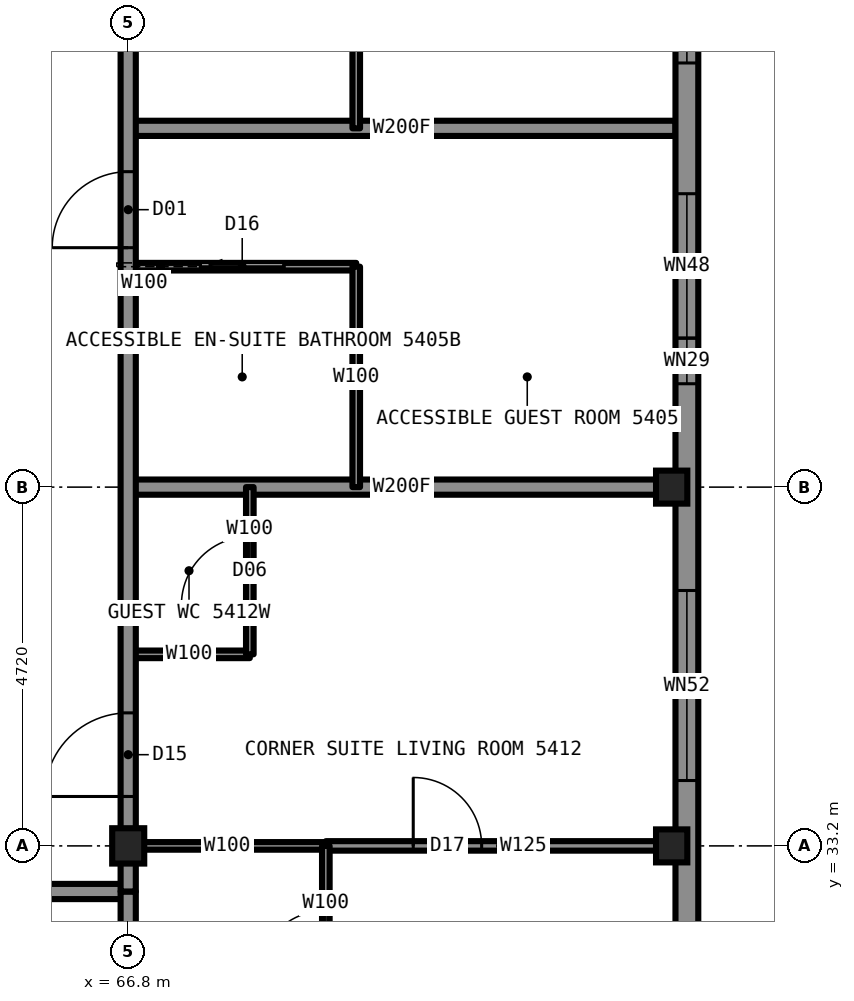
"""IFC4 building model, lengths in metres.
Left out: names, types, materials, properties, quantities, classifications, styles, units other than length and angle.
Written with IfcOpenShell. Run it as: python <this file> out.ifc"""

import sys

from ifc_helpers import new_model, si_unit, direction, frame, frame_2d, origin, origin_2d, place, context, subcontext, project, spatial, rectangle, i_section, extrude, element, fill, save


model = new_model("IFC4")
c1 = context("Model", 3, precision=1e-05, world=origin(), true_north=direction((0.0, 1.0)))
c2 = subcontext(c1, "Body", "Model", "MODEL_VIEW")
j1 = project(units=[si_unit("LENGTHUNIT", "METRE"), si_unit("PLANEANGLEUNIT", "RADIAN")], contexts=[c1])
p1 = place(None, origin())
s1 = spatial("IfcSite", under=j1, at=p1, CompositionType="ELEMENT")
p2 = place(p1, origin())
s2 = spatial("IfcBuilding", under=s1, at=p2, CompositionType="ELEMENT")
p3 = place(p2, frame((0.0, 0.0, 193.3)))
s3 = spatial("IfcBuildingStorey", under=s2, at=p3, CompositionType="ELEMENT", Elevation=193.3)
for number, where, z_axis, x_axis in (
    (1, (73.95, 33.2, 0.0), (0.0, 0.0, 1.0), (1.0, 0.0, 0.0)),
    (2, (73.95, 37.92, 0.0), (0.0, 0.0, 1.0), (1.0, 0.0, 0.0)),
):
    element("IfcColumn", number, at=place(p3, frame(where, z_axis=z_axis, x_axis=x_axis)), inside=s3, PredefinedType="COLUMN", context=c2, shape_type="SweptSolid", body=[
        extrude(i_section(OverallWidth=0.411, OverallDepth=0.434, WebThickness=0.036, FlangeThickness=0.057, at=origin_2d()), origin(), (0.0, 0.0, 1.0), 3.5),
    ])
p4 = place(p3, frame((66.8, 33.2, 0.0), z_axis=(0.0, 0.0, 1.0), x_axis=(1.0, 0.0, 0.0)))
e3 = element("IfcColumn", 3, at=p4, inside=s3, PredefinedType="COLUMN", context=c2, shape_type="SweptSolid", body=[
    extrude(i_section(OverallWidth=0.422, OverallDepth=0.465, WebThickness=0.045, FlangeThickness=0.073, at=origin_2d()), origin(), (0.0, 0.0, 1.0), 3.5),
])
p5 = place(p3, frame((66.8, 33.2, 0.0), z_axis=(0.0, 0.0, 1.0), x_axis=(1.0, 0.0, 0.0)))
e4 = element("IfcWall", 4, at=p5, inside=s3, PredefinedType="PARTITIONING", context=c2, shape_type="SweptSolid", body=[
    extrude(rectangle(XDim=2.6, YDim=0.1, at=frame_2d((1.3, 0.0))), origin(), (0.0, 0.0, 1.0), 2.573),
])
p6 = place(p3, frame((69.4, 33.2, 0.0), z_axis=(0.0, 0.0, 1.0), x_axis=(1.0, 0.0, 0.0)))
e5 = element("IfcWall", 5, at=p6, inside=s3, PredefinedType="PARTITIONING", context=c2, shape_type="SweptSolid", body=[
    extrude(rectangle(XDim=4.6, YDim=0.125, at=frame_2d((2.3, 0.0))), origin(), (0.0, 0.0, 1.0), 2.573),
])
p7 = place(p6, frame((1.15, 0.0, 0.0)))
e6 = element("IfcOpeningElement", 6, at=p7, cuts=e5, PredefinedType="OPENING", context=c2, shape_type="SweptSolid", body=[
    extrude(rectangle(XDim=0.9, YDim=2.2, at=frame_2d((0.45, 1.1))), frame((0.0, 0.073, 0.0), z_axis=(0.0, -1.0, 0.0), x_axis=(1.0, 0.0, 0.0)), (0.0, 0.0, 1.0), 0.145),
])
p8 = place(p3, frame((43.2, 32.6, 0.0), z_axis=(0.0, 0.0, 1.0), x_axis=(1.0, 0.0, 0.0)))
e7 = element("IfcWall", 7, at=p8, inside=s3, PredefinedType="PARTITIONING", context=c2, shape_type="SweptSolid", body=[
    extrude(rectangle(XDim=23.6, YDim=0.2, at=frame_2d((11.8, 0.0))), origin(), (0.0, 0.0, 1.0), 3.33),
])
p9 = place(p8, frame((3.0, 0.0, 0.0)))
e8 = element("IfcOpeningElement", 8, at=p9, cuts=e7, PredefinedType="OPENING", context=c2, shape_type="SweptSolid", body=[
    extrude(rectangle(XDim=1.0, YDim=2.2, at=frame_2d((0.5, 1.1))), frame((0.0, 0.11, 0.0), z_axis=(0.0, -1.0, 0.0), x_axis=(1.0, 0.0, 0.0)), (0.0, 0.0, 1.0), 0.22),
])
p10 = place(p8, frame((11.29, 0.0, 0.0)))
e9 = element("IfcOpeningElement", 9, at=p10, cuts=e7, PredefinedType="OPENING", context=c2, shape_type="SweptSolid", body=[
    extrude(rectangle(XDim=1.1, YDim=2.2, at=frame_2d((0.55, 1.1))), frame((0.0, 0.11, 0.0), z_axis=(0.0, -1.0, 0.0), x_axis=(1.0, 0.0, 0.0)), (0.0, 0.0, 1.0), 0.22),
])
p11 = place(p3, frame((66.8, 42.64, 0.0), z_axis=(0.0, 0.0, 1.0), x_axis=(1.0, 0.0, 0.0)))
e10 = element("IfcWall", 10, at=p11, inside=s3, PredefinedType="PARTITIONING", context=c2, shape_type="SweptSolid", body=[
    extrude(rectangle(XDim=7.2, YDim=0.2, at=frame_2d((3.6, 0.0))), origin(), (0.0, 0.0, 1.0), 2.73),
])
p12 = place(p3, frame((66.8, 40.82, 0.0), z_axis=(0.0, 0.0, 1.0), x_axis=(1.0, 0.0, 0.0)))
e11 = element("IfcWall", 11, at=p12, inside=s3, PredefinedType="PARTITIONING", context=c2, shape_type="SweptSolid", body=[
    extrude(rectangle(XDim=3.0, YDim=0.1, at=frame_2d((1.5, 0.0))), origin(), (0.0, 0.0, 1.0), 3.33),
])
p13 = place(p12, frame((0.95, 0.0, 0.0)))
e12 = element("IfcOpeningElement", 12, at=p13, cuts=e11, PredefinedType="OPENING", context=c2, shape_type="SweptSolid", body=[
    extrude(rectangle(XDim=1.1, YDim=2.1, at=frame_2d((0.55, 1.05))), frame((0.0, 0.06, 0.0), z_axis=(0.0, -1.0, 0.0), x_axis=(1.0, 0.0, 0.0)), (0.0, 0.0, 1.0), 0.12),
])
p14 = place(p3, frame((66.8, 37.92, 0.0), z_axis=(0.0, 0.0, 1.0), x_axis=(1.0, 0.0, 0.0)))
e13 = element("IfcWall", 13, at=p14, inside=s3, PredefinedType="PARTITIONING", context=c2, shape_type="SweptSolid", body=[
    extrude(rectangle(XDim=7.2, YDim=0.2, at=frame_2d((3.6, 0.0))), origin(), (0.0, 0.0, 1.0), 2.573),
])
p15 = place(p3, frame((66.8, 35.72, 0.0), z_axis=(0.0, 0.0, 1.0), x_axis=(1.0, 0.0, 0.0)))
e14 = element("IfcWall", 14, at=p15, inside=s3, PredefinedType="PARTITIONING", context=c2, shape_type="SweptSolid", body=[
    extrude(rectangle(XDim=1.6, YDim=0.1, at=frame_2d((0.8, 0.0))), origin(), (0.0, 0.0, 1.0), 3.33),
])
p16 = place(p3, frame((66.8, 33.22, 0.0), z_axis=(0.0, 0.0, 1.0), x_axis=(0.0, 1.0, 0.0)))
e15 = element("IfcWall", 15, at=p16, inside=s3, PredefinedType="PARTITIONING", context=c2, shape_type="SweptSolid", body=[
    extrude(rectangle(XDim=23.56, YDim=0.2, at=frame_2d((11.78, 0.0))), origin(), (0.0, 0.0, 1.0), 3.33),
])
p17 = place(p16, frame((7.85, 0.0, 0.0)))
e16 = element("IfcOpeningElement", 16, at=p17, cuts=e15, PredefinedType="OPENING", context=c2, shape_type="SweptSolid", body=[
    extrude(rectangle(XDim=1.0, YDim=2.2, at=frame_2d((0.5, 1.1))), frame((0.0, 0.11, 0.0), z_axis=(0.0, -1.0, 0.0), x_axis=(1.0, 0.0, 0.0)), (0.0, 0.0, 1.0), 0.22),
])
p18 = place(p16, frame((12.42, 0.0, 0.0)))
e17 = element("IfcOpeningElement", 17, at=p18, cuts=e15, PredefinedType="OPENING", context=c2, shape_type="SweptSolid", body=[
    extrude(rectangle(XDim=1.0, YDim=2.2, at=frame_2d((0.5, 1.1))), frame((0.0, 0.11, 0.0), z_axis=(0.0, -1.0, 0.0), x_axis=(1.0, 0.0, 0.0)), (0.0, 0.0, 1.0), 0.22),
])
p19 = place(p16, frame((22.03, 0.0, 0.0)))
e18 = element("IfcOpeningElement", 18, at=p19, cuts=e15, PredefinedType="OPENING", context=c2, shape_type="SweptSolid", body=[
    extrude(rectangle(XDim=1.1, YDim=2.2, at=frame_2d((0.55, 1.1))), frame((0.0, 0.11, 0.0), z_axis=(0.0, -1.0, 0.0), x_axis=(1.0, 0.0, 0.0)), (0.0, 0.0, 1.0), 0.22),
])
p20 = place(p16, frame((0.63, 0.0, 0.0)))
e19 = element("IfcOpeningElement", 19, at=p20, cuts=e15, PredefinedType="OPENING", context=c2, shape_type="SweptSolid", body=[
    extrude(rectangle(XDim=1.1, YDim=2.2, at=frame_2d((0.55, 1.1))), frame((0.0, 0.11, 0.0), z_axis=(0.0, -1.0, 0.0), x_axis=(1.0, 0.0, 0.0)), (0.0, 0.0, 1.0), 0.22),
])
p21 = place(p3, frame((66.8, 26.0, 0.0), z_axis=(0.0, 0.0, 1.0), x_axis=(0.0, 1.0, 0.0)))
e20 = element("IfcWall", 20, at=p21, inside=s3, PredefinedType="PARTITIONING", context=c2, shape_type="SweptSolid", body=[
    extrude(rectangle(XDim=6.6, YDim=0.2, at=frame_2d((3.3, 0.0))), origin(), (0.0, 0.0, 1.0), 2.573),
])
p22 = place(p3, frame((68.4, 35.72, 0.0), z_axis=(0.0, 0.0, 1.0), x_axis=(0.0, 1.0, 0.0)))
e21 = element("IfcWall", 21, at=p22, inside=s3, PredefinedType="PARTITIONING", context=c2, shape_type="SweptSolid", body=[
    extrude(rectangle(XDim=2.2, YDim=0.1, at=frame_2d((1.1, 0.0))), origin(), (0.0, 0.0, 1.0), 3.33),
])
p23 = place(p22, frame((0.65, 0.0, 0.0)))
e22 = element("IfcOpeningElement", 22, at=p23, cuts=e21, PredefinedType="OPENING", context=c2, shape_type="SweptSolid", body=[
    extrude(rectangle(XDim=0.9, YDim=2.1, at=frame_2d((0.45, 1.05))), frame((0.0, 0.06, 0.0), z_axis=(0.0, -1.0, 0.0), x_axis=(1.0, 0.0, 0.0)), (0.0, 0.0, 1.0), 0.12),
])
p24 = place(p3, frame((69.4, 30.6, 0.0), z_axis=(0.0, 0.0, 1.0), x_axis=(0.0, 1.0, 0.0)))
e23 = element("IfcWall", 23, at=p24, inside=s3, PredefinedType="PARTITIONING", context=c2, shape_type="SweptSolid", body=[
    extrude(rectangle(XDim=2.6, YDim=0.1, at=frame_2d((1.3, 0.0))), origin(), (0.0, 0.0, 1.0), 3.33),
])
p25 = place(p24, frame((0.85, 0.0, 0.0)))
e24 = element("IfcOpeningElement", 24, at=p25, cuts=e23, PredefinedType="OPENING", context=c2, shape_type="SweptSolid", body=[
    extrude(rectangle(XDim=0.9, YDim=2.1, at=frame_2d((0.45, 1.05))), frame((0.0, 0.06, 0.0), z_axis=(0.0, -1.0, 0.0), x_axis=(1.0, 0.0, 0.0)), (0.0, 0.0, 1.0), 0.12),
])
p26 = place(p3, frame((69.8, 37.92, 0.0), z_axis=(0.0, 0.0, 1.0), x_axis=(0.0, 1.0, 0.0)))
e25 = element("IfcWall", 25, at=p26, inside=s3, PredefinedType="PARTITIONING", context=c2, shape_type="SweptSolid", body=[
    extrude(rectangle(XDim=2.9, YDim=0.1, at=frame_2d((1.45, 0.0))), origin(), (0.0, 0.0, 1.0), 3.33),
])
p27 = place(p3, frame((69.8, 42.64, 0.0), z_axis=(0.0, 0.0, 1.0), x_axis=(0.0, 1.0, 0.0)))
e26 = element("IfcWall", 26, at=p27, inside=s3, PredefinedType="PARTITIONING", context=c2, shape_type="SweptSolid", body=[
    extrude(rectangle(XDim=2.6, YDim=0.1, at=frame_2d((1.3, 0.0))), origin(), (0.0, 0.0, 1.0), 3.33),
])
p28 = place(p3, frame((74.15, 31.2, 0.0), z_axis=(0.0, 0.0, 1.0), x_axis=(0.0, 1.0, 0.0)))
e27 = element("IfcWall", 27, at=p28, inside=s3, PredefinedType="SOLIDWALL", context=c2, shape_type="SweptSolid", body=[
    extrude(rectangle(XDim=27.6, YDim=0.3, at=frame_2d((13.8, 0.0))), origin(), (0.0, 0.0, 1.0), 2.83),
])
p29 = place(p28, frame((2.86, 0.0, 0.3)))
e28 = element("IfcOpeningElement", 28, at=p29, cuts=e27, PredefinedType="OPENING", context=c2, shape_type="SweptSolid", body=[
    extrude(rectangle(XDim=3.0, YDim=2.0, at=frame_2d((1.5, 1.0))), frame((0.0, 0.16, 0.0), z_axis=(0.0, -1.0, 0.0), x_axis=(1.0, 0.0, 0.0)), (0.0, 0.0, 1.0), 0.32),
])
p30 = place(p28, frame((7.58, 0.0, 0.3)))
e29 = element("IfcOpeningElement", 29, at=p30, cuts=e27, PredefinedType="OPENING", context=c2, shape_type="SweptSolid", body=[
    extrude(rectangle(XDim=2.5, YDim=2.0, at=frame_2d((1.25, 1.0))), frame((0.0, 0.16, 0.0), z_axis=(0.0, -1.0, 0.0), x_axis=(1.0, 0.0, 0.0)), (0.0, 0.0, 1.0), 0.32),
])
p31 = place(p28, frame((12.95, 0.0, 1.0)))
e30 = element("IfcOpeningElement", 30, at=p31, cuts=e27, PredefinedType="OPENING", context=c2, shape_type="SweptSolid", body=[
    extrude(rectangle(XDim=1.7, YDim=1.3, at=frame_2d((0.85, 0.65))), frame((0.0, 0.16, 0.0), z_axis=(0.0, -1.0, 0.0), x_axis=(1.0, 0.0, 0.0)), (0.0, 0.0, 1.0), 0.32),
])
p32 = place(p28, frame((17.52, 0.0, 0.3)))
e31 = element("IfcOpeningElement", 31, at=p32, cuts=e27, PredefinedType="OPENING", context=c2, shape_type="SweptSolid", body=[
    extrude(rectangle(XDim=2.5, YDim=2.0, at=frame_2d((1.25, 1.0))), frame((0.0, 0.16, 0.0), z_axis=(0.0, -1.0, 0.0), x_axis=(1.0, 0.0, 0.0)), (0.0, 0.0, 1.0), 0.32),
])
p33 = place(p28, frame((21.74, 0.0, 0.3)))
e32 = element("IfcOpeningElement", 32, at=p33, cuts=e27, PredefinedType="OPENING", context=c2, shape_type="SweptSolid", body=[
    extrude(rectangle(XDim=3.0, YDim=2.0, at=frame_2d((1.5, 1.0))), frame((0.0, 0.16, 0.0), z_axis=(0.0, -1.0, 0.0), x_axis=(1.0, 0.0, 0.0)), (0.0, 0.0, 1.0), 0.32),
])
p34 = place(p3, frame((66.8, 32.6, 0.0), z_axis=(0.0, 0.0, 1.0), x_axis=(0.0, 1.0, 0.0)))
e33 = element("IfcWall", 33, at=p34, inside=s3, PredefinedType="PARTITIONING", context=c2, shape_type="SweptSolid", body=[
    extrude(rectangle(XDim=0.62, YDim=0.2, at=frame_2d((0.31, 0.0))), origin(), (0.0, 0.0, 1.0), 2.573),
])
p35 = place(p17, origin())
e34 = element("IfcDoor", 34, at=p35, inside=s3, OperationType="SINGLE_SWING_LEFT", PredefinedType="DOOR", context=c2, shape_type="SweptSolid", body=[
    extrude(rectangle(XDim=1.0, YDim=2.2, at=frame_2d((0.5, 1.1))), frame((0.0, 0.025, 0.0), z_axis=(0.0, -1.0, 0.0), x_axis=(1.0, 0.0, 0.0)), (0.0, 0.0, 1.0), 0.05),
])
fill(e16, e34)
p36 = place(p13, origin())
e35 = element("IfcDoor", 35, at=p36, inside=s3, OperationType="SLIDING_TO_LEFT", PredefinedType="DOOR", context=c2, shape_type="SweptSolid", body=[
    extrude(rectangle(XDim=1.1, YDim=2.1, at=frame_2d((0.55, 1.05))), frame((0.0, 0.025, 0.0), z_axis=(0.0, -1.0, 0.0), x_axis=(1.0, 0.0, 0.0)), (0.0, 0.0, 1.0), 0.05),
])
fill(e12, e35)
p37 = place(p20, origin())
e36 = element("IfcDoor", 36, at=p37, inside=s3, OperationType="SINGLE_SWING_LEFT", PredefinedType="DOOR", context=c2, shape_type="SweptSolid", body=[
    extrude(rectangle(XDim=1.1, YDim=2.2, at=frame_2d((0.55, 1.1))), frame((0.0, 0.025, 0.0), z_axis=(0.0, -1.0, 0.0), x_axis=(1.0, 0.0, 0.0)), (0.0, 0.0, 1.0), 0.05),
])
fill(e19, e36)
p38 = place(p25, origin())
e37 = element("IfcDoor", 37, at=p38, inside=s3, OperationType="SINGLE_SWING_RIGHT", PredefinedType="DOOR", context=c2, shape_type="SweptSolid", body=[
    extrude(rectangle(XDim=0.9, YDim=2.1, at=frame_2d((0.45, 1.05))), frame((0.0, 0.025, 0.0), z_axis=(0.0, -1.0, 0.0), x_axis=(1.0, 0.0, 0.0)), (0.0, 0.0, 1.0), 0.05),
])
fill(e24, e37)
p39 = place(p7, origin())
e38 = element("IfcDoor", 38, at=p39, inside=s3, OperationType="SINGLE_SWING_LEFT", PredefinedType="DOOR", context=c2, shape_type="SweptSolid", body=[
    extrude(rectangle(XDim=0.9, YDim=2.2, at=frame_2d((0.45, 1.1))), frame((0.0, 0.025, 0.0), z_axis=(0.0, -1.0, 0.0), x_axis=(1.0, 0.0, 0.0)), (0.0, 0.0, 1.0), 0.05),
])
fill(e6, e38)
p40 = place(p23, origin())
e39 = element("IfcDoor", 39, at=p40, inside=s3, OperationType="SINGLE_SWING_LEFT", PredefinedType="DOOR", context=c2, shape_type="SweptSolid", body=[
    extrude(rectangle(XDim=0.9, YDim=2.1, at=frame_2d((0.45, 1.05))), frame((0.0, 0.025, 0.0), z_axis=(0.0, -1.0, 0.0), x_axis=(1.0, 0.0, 0.0)), (0.0, 0.0, 1.0), 0.05),
])
fill(e22, e39)
p41 = place(p29, origin())
e40 = element("IfcWindow", 40, at=p41, inside=s3, PartitioningType="SINGLE_PANEL", PredefinedType="WINDOW", context=c2, shape_type="SweptSolid", body=[
    extrude(rectangle(XDim=3.0, YDim=2.0, at=frame_2d((1.5, 1.0))), frame((0.0, 0.13, 0.0), z_axis=(0.0, -1.0, 0.0), x_axis=(1.0, 0.0, 0.0)), (0.0, 0.0, 1.0), 0.06),
])
fill(e28, e40)
p42 = place(p30, origin())
e41 = element("IfcWindow", 41, at=p42, inside=s3, PartitioningType="SINGLE_PANEL", PredefinedType="WINDOW", context=c2, shape_type="SweptSolid", body=[
    extrude(rectangle(XDim=2.5, YDim=2.0, at=frame_2d((1.25, 1.0))), frame((0.0, 0.13, 0.0), z_axis=(0.0, -1.0, 0.0), x_axis=(1.0, 0.0, 0.0)), (0.0, 0.0, 1.0), 0.06),
])
fill(e29, e41)
save(model, sys.argv[1])
